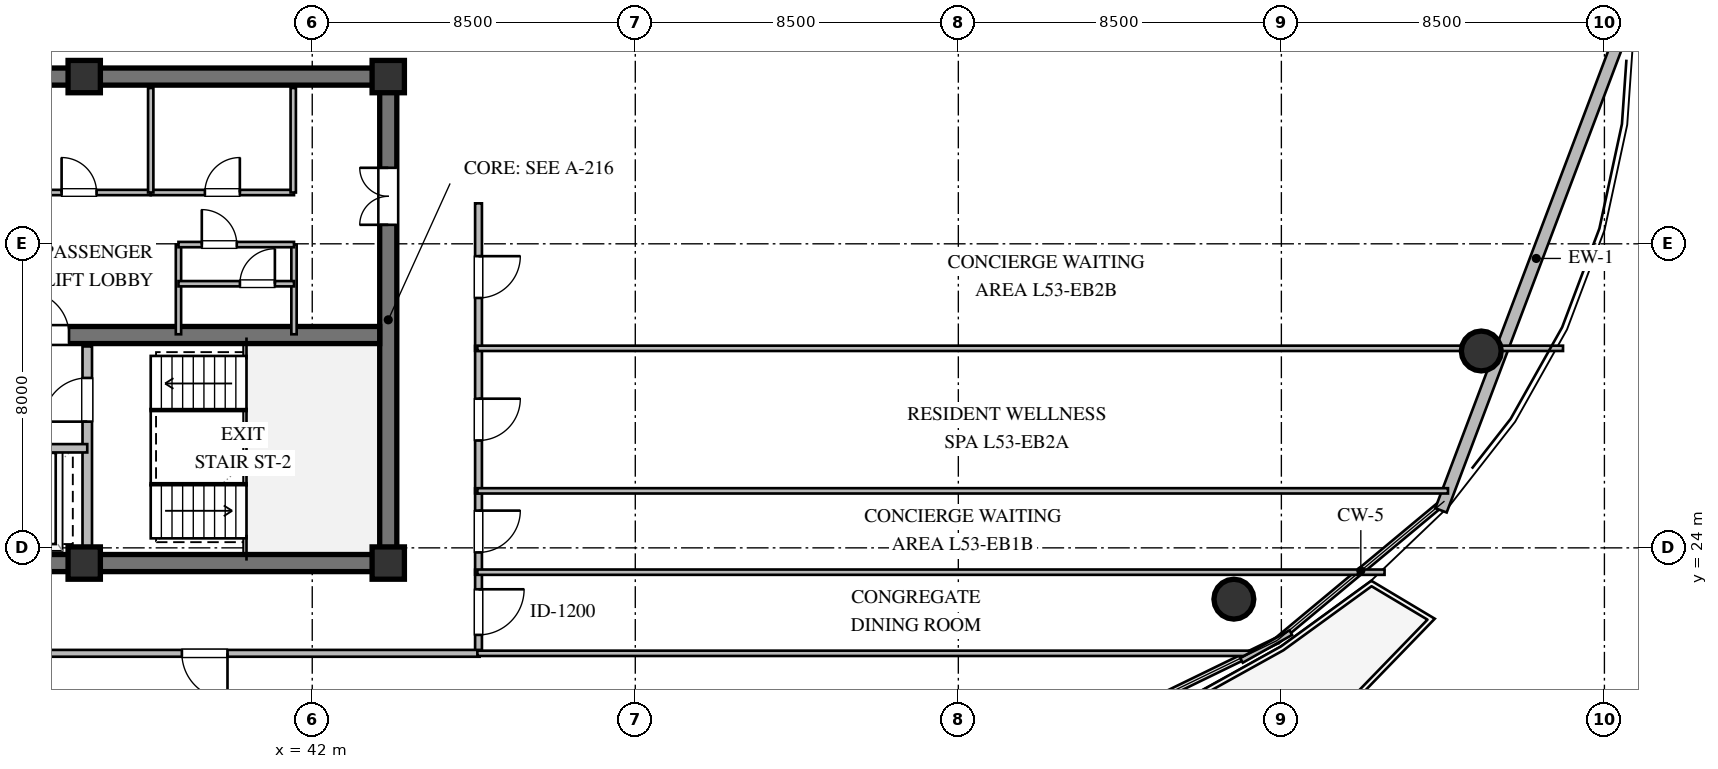
"""IFC4 building model, lengths in metres.
Left out: names, types, materials, properties, quantities, classifications, styles, units other than length and angle.
Written with IfcOpenShell. Run it as: python <this file> out.ifc"""

import sys

from ifc_helpers import new_model, si_unit, direction, frame, frame_2d, origin, origin_2d, place, context, subcontext, project, spatial, rectangle, circle, extrude, element, fill, save


model = new_model("IFC4")
c1 = context("Model", 3, precision=1e-05, world=origin(), true_north=direction((0.0, 1.0)))
c2 = subcontext(c1, "Body", "Model", "MODEL_VIEW")
j1 = project(units=[si_unit("LENGTHUNIT", "METRE"), si_unit("PLANEANGLEUNIT", "RADIAN")], contexts=[c1])
p1 = place(None, origin())
s1 = spatial("IfcSite", under=j1, at=p1, CompositionType="ELEMENT")
p2 = place(p1, origin())
s2 = spatial("IfcBuilding", under=s1, at=p2, CompositionType="ELEMENT")
p3 = place(p2, frame((0.0, 0.0, 202.8)))
s3 = spatial("IfcBuildingStorey", under=s2, at=p3, CompositionType="ELEMENT", Elevation=202.8)
for number, where, z_axis, x_axis in (
    (1, (21.775, 23.6, 0.0), (0.0, 0.0, 1.0), (1.0, 0.0, 0.0)),
    (2, (21.775, 36.4, 0.0), (0.0, 0.0, 1.0), (1.0, 0.0, 0.0)),
):
    element("IfcWall", number, at=place(p3, frame(where, z_axis=z_axis, x_axis=x_axis)), inside=s3, PredefinedType="SHEAR", context=c2, shape_type="SweptSolid", body=[
        extrude(rectangle(XDim=22.45, YDim=0.45, at=frame_2d((11.225, 0.0))), origin(), (0.0, 0.0, 1.0), 3.36),
    ])
p4 = place(p3, frame((44.0, 23.825, 0.0), z_axis=(0.0, 0.0, 1.0), x_axis=(0.0, 1.0, 0.0)))
e3 = element("IfcWall", 3, at=p4, inside=s3, PredefinedType="SHEAR", context=c2, shape_type="SweptSolid", body=[
    extrude(rectangle(XDim=12.35, YDim=0.45, at=frame_2d((6.175, 0.0))), origin(), (0.0, 0.0, 1.0), 3.36),
])
p5 = place(p4, frame((8.675, 0.0, 0.0)))
e4 = element("IfcOpeningElement", 4, at=p5, cuts=e3, PredefinedType="OPENING", context=c2, shape_type="SweptSolid", body=[
    extrude(rectangle(XDim=1.5, YDim=2.15, at=frame_2d((0.75, 1.075))), frame((0.0, 0.235, 0.0), z_axis=(0.0, -1.0, 0.0), x_axis=(1.0, 0.0, 0.0)), (0.0, 0.0, 1.0), 0.47),
])
p6 = place(p3, frame((22.225, 29.6, 0.0), z_axis=(0.0, 0.0, 1.0), x_axis=(1.0, 0.0, 0.0)))
e5 = element("IfcWall", 5, at=p6, inside=s3, PredefinedType="SHEAR", context=c2, shape_type="SweptSolid", body=[
    extrude(rectangle(XDim=21.55, YDim=0.45, at=frame_2d((10.775, 0.0))), origin(), (0.0, 0.0, 1.0), 3.36),
])
p7 = place(p6, frame((12.225, 0.0, 0.0)))
e6 = element("IfcOpeningElement", 6, at=p7, cuts=e5, PredefinedType="OPENING", context=c2, shape_type="SweptSolid", body=[
    extrude(rectangle(XDim=1.15, YDim=2.1, at=frame_2d((0.575, 1.05))), frame((0.0, 0.235, 0.0), z_axis=(0.0, -1.0, 0.0), x_axis=(1.0, 0.0, 0.0)), (0.0, 0.0, 1.0), 0.47),
])
for number, where, z_axis, x_axis in (
    (7, (36.0, 23.6, 0.0), (0.0, 0.0, 1.0), (1.0, 0.0, 0.0)),
    (8, (44.0, 23.6, 0.0), (0.0, 0.0, 1.0), (1.0, 0.0, 0.0)),
    (9, (44.0, 36.4, 0.0), (0.0, 0.0, 1.0), (1.0, 0.0, 0.0)),
    (10, (36.0, 36.4, 0.0), (0.0, 0.0, 1.0), (1.0, 0.0, 0.0)),
):
    element("IfcColumn", number, at=place(p3, frame(where, z_axis=z_axis, x_axis=x_axis)), inside=s3, PredefinedType="COLUMN", context=c2, shape_type="SweptSolid", body=[
        extrude(rectangle(XDim=0.85, YDim=0.85, at=origin_2d()), origin(), (0.0, 0.0, 1.0), 3.6),
    ])
for number, where, z_axis, x_axis in (
    (11, (66.25, 22.65, 0.0), (0.0, 0.0, 1.0), (1.0, 0.0, 0.0)),
    (12, (72.76, 29.18, 0.0), (0.0, 0.0, 1.0), (1.0, 0.0, 0.0)),
):
    element("IfcColumn", number, at=place(p3, frame(where, z_axis=z_axis, x_axis=x_axis)), inside=s3, PredefinedType="COLUMN", context=c2, shape_type="SweptSolid", body=[
        extrude(circle(Radius=0.525, at=origin_2d()), origin(), (0.0, 0.0, 1.0), 3.6),
    ])
p8 = place(p3, frame((76.712, 38.243, 0.0), z_axis=(0.0, 0.0, 1.0), x_axis=(-0.353659523244, -0.935374225441, 0.0)))
e13 = element("IfcWall", 13, at=p8, inside=s3, PredefinedType="STANDARD", context=c2, shape_type="SweptSolid", body=[
    extrude(rectangle(XDim=14.172, YDim=0.32, at=frame_2d((7.086, 0.0))), origin(), (0.0, 0.0, 1.0), 3.36),
])
p9 = place(p3, frame((36.08, 23.9, 0.0), z_axis=(0.0, 0.0, 1.0), x_axis=(0.0, 1.0, 0.0)))
e14 = element("IfcWall", 14, at=p9, inside=s3, PredefinedType="SOLIDWALL", context=c2, shape_type="SweptSolid", body=[
    extrude(rectangle(XDim=5.4, YDim=0.25, at=frame_2d((2.7, 0.0))), origin(), (0.0, 0.0, 1.0), 3.36),
])
p10 = place(p9, frame((3.421, 0.0, 0.0)))
e15 = element("IfcOpeningElement", 15, at=p10, cuts=e14, PredefinedType="OPENING", context=c2, shape_type="SweptSolid", body=[
    extrude(rectangle(XDim=1.15, YDim=2.1, at=frame_2d((0.575, 1.05))), frame((0.0, 0.135, 0.0), z_axis=(0.0, -1.0, 0.0), x_axis=(1.0, 0.0, 0.0)), (0.0, 0.0, 1.0), 0.27),
])
p11 = place(p3, frame((29.92, 26.62, 0.0), z_axis=(0.0, 0.0, 1.0), x_axis=(1.0, 0.0, 0.0)))
e16 = element("IfcWall", 16, at=p11, inside=s3, PredefinedType="SOLIDWALL", context=c2, shape_type="SweptSolid", body=[
    extrude(rectangle(XDim=6.16, YDim=0.22, at=frame_2d((3.08, 0.0))), origin(), (0.0, 0.0, 1.0), 3.36),
])
p12 = place(p11, frame((0.99, 0.0, 0.0)))
e17 = element("IfcOpeningElement", 17, at=p12, cuts=e16, PredefinedType="OPENING", context=c2, shape_type="SweptSolid", body=[
    extrude(rectangle(XDim=1.1, YDim=2.1, at=frame_2d((0.55, 1.05))), frame((0.0, 0.12, 0.0), z_axis=(0.0, -1.0, 0.0), x_axis=(1.0, 0.0, 0.0)), (0.0, 0.0, 1.0), 0.24),
])
p13 = place(p11, frame((4.07, 0.0, 0.0)))
e18 = element("IfcOpeningElement", 18, at=p13, cuts=e16, PredefinedType="OPENING", context=c2, shape_type="SweptSolid", body=[
    extrude(rectangle(XDim=1.1, YDim=2.1, at=frame_2d((0.55, 1.05))), frame((0.0, 0.12, 0.0), z_axis=(0.0, -1.0, 0.0), x_axis=(1.0, 0.0, 0.0)), (0.0, 0.0, 1.0), 0.24),
])
p14 = place(p3, frame((33.98, 33.35, 0.0), z_axis=(0.0, 0.0, 1.0), x_axis=(1.0, 0.0, 0.0)))
e19 = element("IfcWall", 19, at=p14, inside=s3, PredefinedType="PARTITIONING", context=c2, shape_type="SweptSolid", body=[
    extrude(rectangle(XDim=3.77, YDim=0.14, at=frame_2d((1.885, 0.0))), origin(), (0.0, 0.0, 1.0), 3.36),
])
p15 = place(p14, frame((1.425, 0.0, 0.0)))
e20 = element("IfcOpeningElement", 20, at=p15, cuts=e19, PredefinedType="OPENING", context=c2, shape_type="SweptSolid", body=[
    extrude(rectangle(XDim=0.92, YDim=2.1, at=frame_2d((0.46, 1.05))), frame((0.0, 0.08, 0.0), z_axis=(0.0, -1.0, 0.0), x_axis=(1.0, 0.0, 0.0)), (0.0, 0.0, 1.0), 0.16),
])
p16 = place(p3, frame((37.75, 33.35, 0.0), z_axis=(0.0, 0.0, 1.0), x_axis=(1.0, 0.0, 0.0)))
e21 = element("IfcWall", 21, at=p16, inside=s3, PredefinedType="PARTITIONING", context=c2, shape_type="SweptSolid", body=[
    extrude(rectangle(XDim=3.77, YDim=0.14, at=frame_2d((1.885, 0.0))), origin(), (0.0, 0.0, 1.0), 3.36),
])
p17 = place(p16, frame((1.425, 0.0, 0.0)))
e22 = element("IfcOpeningElement", 22, at=p17, cuts=e21, PredefinedType="OPENING", context=c2, shape_type="SweptSolid", body=[
    extrude(rectangle(XDim=0.92, YDim=2.1, at=frame_2d((0.46, 1.05))), frame((0.0, 0.08, 0.0), z_axis=(0.0, -1.0, 0.0), x_axis=(1.0, 0.0, 0.0)), (0.0, 0.0, 1.0), 0.16),
])
for number, where, z_axis, x_axis in (
    (23, (37.75, 33.35, 0.0), (0.0, 0.0, 1.0), (0.0, 1.0, 0.0)),
    (24, (41.5, 33.35, 0.0), (0.0, 0.0, 1.0), (0.0, 1.0, 0.0)),
):
    element("IfcWall", number, at=place(p3, frame(where, z_axis=z_axis, x_axis=x_axis)), inside=s3, PredefinedType="PARTITIONING", context=c2, shape_type="SweptSolid", body=[
        extrude(rectangle(XDim=2.75, YDim=0.14, at=frame_2d((1.375, 0.0))), origin(), (0.0, 0.0, 1.0), 3.36),
    ])
for number, where, z_axis, x_axis in (
    (25, (38.48, 29.62, 0.0), (0.0, 0.0, 1.0), (0.0, 1.0, 0.0)),
    (26, (41.52, 29.62, 0.0), (0.0, 0.0, 1.0), (0.0, 1.0, 0.0)),
):
    element("IfcWall", number, at=place(p3, frame(where, z_axis=z_axis, x_axis=x_axis)), inside=s3, PredefinedType="PARTITIONING", context=c2, shape_type="SweptSolid", body=[
        extrude(rectangle(XDim=2.36, YDim=0.14, at=frame_2d((1.18, 0.0))), origin(), (0.0, 0.0, 1.0), 3.36),
    ])
p18 = place(p3, frame((38.48, 30.95, 0.0), z_axis=(0.0, 0.0, 1.0), x_axis=(1.0, 0.0, 0.0)))
e27 = element("IfcWall", 27, at=p18, inside=s3, PredefinedType="PARTITIONING", context=c2, shape_type="SweptSolid", body=[
    extrude(rectangle(XDim=3.04, YDim=0.14, at=frame_2d((1.52, 0.0))), origin(), (0.0, 0.0, 1.0), 3.36),
])
p19 = place(p18, frame((1.617, 0.0, 0.0)))
e28 = element("IfcOpeningElement", 28, at=p19, cuts=e27, PredefinedType="OPENING", context=c2, shape_type="SweptSolid", body=[
    extrude(rectangle(XDim=0.92, YDim=2.1, at=frame_2d((0.46, 1.05))), frame((0.0, 0.08, 0.0), z_axis=(0.0, -1.0, 0.0), x_axis=(1.0, 0.0, 0.0)), (0.0, 0.0, 1.0), 0.16),
])
p20 = place(p3, frame((38.48, 31.98, 0.0), z_axis=(0.0, 0.0, 1.0), x_axis=(1.0, 0.0, 0.0)))
e29 = element("IfcWall", 29, at=p20, inside=s3, PredefinedType="PARTITIONING", context=c2, shape_type="SweptSolid", body=[
    extrude(rectangle(XDim=3.04, YDim=0.14, at=frame_2d((1.52, 0.0))), origin(), (0.0, 0.0, 1.0), 3.36),
])
p21 = place(p20, frame((0.614, 0.0, 0.0)))
e30 = element("IfcOpeningElement", 30, at=p21, cuts=e29, PredefinedType="OPENING", context=c2, shape_type="SweptSolid", body=[
    extrude(rectangle(XDim=0.92, YDim=2.1, at=frame_2d((0.46, 1.05))), frame((0.0, 0.08, 0.0), z_axis=(0.0, -1.0, 0.0), x_axis=(1.0, 0.0, 0.0)), (0.0, 0.0, 1.0), 0.16),
])
p22 = place(p3, frame((46.375, 23.425, 0.0), z_axis=(0.0, 0.0, 1.0), x_axis=(0.0, -1.0, 0.0)))
e31 = element("IfcWall", 31, at=p22, inside=s3, PredefinedType="PARTITIONING", context=c2, shape_type="SweptSolid", body=[
    extrude(rectangle(XDim=2.23, YDim=0.18, at=frame_2d((1.115, 0.0))), origin(), (0.0, 0.0, 1.0), 3.36),
])
p23 = place(p22, frame((0.515, 0.0, 0.0)))
e32 = element("IfcOpeningElement", 32, at=p23, cuts=e31, PredefinedType="OPENING", context=c2, shape_type="SweptSolid", body=[
    extrude(rectangle(XDim=1.2, YDim=2.15, at=frame_2d((0.6, 1.075))), frame((0.0, 0.1, 0.0), z_axis=(0.0, -1.0, 0.0), x_axis=(1.0, 0.0, 0.0)), (0.0, 0.0, 1.0), 0.2),
])
p24 = place(p3, frame((46.375, 25.565, 0.0), z_axis=(0.0, 0.0, 1.0), x_axis=(0.0, -1.0, 0.0)))
e33 = element("IfcWall", 33, at=p24, inside=s3, PredefinedType="PARTITIONING", context=c2, shape_type="SweptSolid", body=[
    extrude(rectangle(XDim=2.27, YDim=0.18, at=frame_2d((1.135, 0.0))), origin(), (0.0, 0.0, 1.0), 3.36),
])
p25 = place(p24, frame((0.585, 0.0, 0.0)))
e34 = element("IfcOpeningElement", 34, at=p25, cuts=e33, PredefinedType="OPENING", context=c2, shape_type="SweptSolid", body=[
    extrude(rectangle(XDim=1.1, YDim=2.1, at=frame_2d((0.55, 1.05))), frame((0.0, 0.1, 0.0), z_axis=(0.0, -1.0, 0.0), x_axis=(1.0, 0.0, 0.0)), (0.0, 0.0, 1.0), 0.2),
])
p26 = place(p3, frame((46.375, 29.315, 0.0), z_axis=(0.0, 0.0, 1.0), x_axis=(0.0, -1.0, 0.0)))
e35 = element("IfcWall", 35, at=p26, inside=s3, PredefinedType="PARTITIONING", context=c2, shape_type="SweptSolid", body=[
    extrude(rectangle(XDim=3.88, YDim=0.18, at=frame_2d((1.94, 0.0))), origin(), (0.0, 0.0, 1.0), 3.36),
])
p27 = place(p26, frame((1.39, 0.0, 0.0)))
e36 = element("IfcOpeningElement", 36, at=p27, cuts=e35, PredefinedType="OPENING", context=c2, shape_type="SweptSolid", body=[
    extrude(rectangle(XDim=1.1, YDim=2.1, at=frame_2d((0.55, 1.05))), frame((0.0, 0.1, 0.0), z_axis=(0.0, -1.0, 0.0), x_axis=(1.0, 0.0, 0.0)), (0.0, 0.0, 1.0), 0.2),
])
p28 = place(p3, frame((46.375, 33.065, 0.0), z_axis=(0.0, 0.0, 1.0), x_axis=(0.0, -1.0, 0.0)))
e37 = element("IfcWall", 37, at=p28, inside=s3, PredefinedType="PARTITIONING", context=c2, shape_type="SweptSolid", body=[
    extrude(rectangle(XDim=3.88, YDim=0.18, at=frame_2d((1.94, 0.0))), origin(), (0.0, 0.0, 1.0), 3.36),
])
p29 = place(p28, frame((1.39, 0.0, 0.0)))
e38 = element("IfcOpeningElement", 38, at=p29, cuts=e37, PredefinedType="OPENING", context=c2, shape_type="SweptSolid", body=[
    extrude(rectangle(XDim=1.1, YDim=2.1, at=frame_2d((0.55, 1.05))), frame((0.0, 0.1, 0.0), z_axis=(0.0, -1.0, 0.0), x_axis=(1.0, 0.0, 0.0)), (0.0, 0.0, 1.0), 0.2),
])
p30 = place(p3, frame((46.405, 21.225, 0.0), z_axis=(0.0, 0.0, 1.0), x_axis=(-1.0, 0.0, 0.0)))
e39 = element("IfcWall", 39, at=p30, inside=s3, PredefinedType="PARTITIONING", context=c2, shape_type="SweptSolid", body=[
    extrude(rectangle(XDim=14.47, YDim=0.18, at=frame_2d((7.235, 0.0))), origin(), (0.0, 0.0, 1.0), 2.996),
])
p31 = place(p30, frame((6.635, 0.0, 0.0)))
e40 = element("IfcOpeningElement", 40, at=p31, cuts=e39, PredefinedType="OPENING", context=c2, shape_type="SweptSolid", body=[
    extrude(rectangle(XDim=1.2, YDim=2.15, at=frame_2d((0.6, 1.075))), frame((0.0, 0.1, 0.0), z_axis=(0.0, -1.0, 0.0), x_axis=(1.0, 0.0, 0.0)), (0.0, 0.0, 1.0), 0.2),
])
p32 = place(p3, frame((46.345, 23.36, 0.0), z_axis=(0.0, 0.0, 1.0), x_axis=(1.0, 0.0, 0.0)))
e41 = element("IfcWall", 41, at=p32, inside=s3, PredefinedType="PARTITIONING", context=c2, shape_type="SweptSolid", body=[
    extrude(rectangle(XDim=23.87, YDim=0.14, at=frame_2d((11.935, 0.0))), origin(), (0.0, 0.0, 1.0), 2.89),
])
p33 = place(p3, frame((66.684, 21.225, 0.0), z_axis=(0.0, 0.0, 1.0), x_axis=(-1.0, 0.0, 0.0)))
e42 = element("IfcWall", 42, at=p33, inside=s3, PredefinedType="PARTITIONING", context=c2, shape_type="SweptSolid", body=[
    extrude(rectangle(XDim=20.339, YDim=0.14, at=frame_2d((10.169, 0.0))), origin(), (0.0, 0.0, 1.0), 2.996),
])
p34 = place(p3, frame((67.748, 21.77, 0.0), z_axis=(0.0, 0.0, 1.0), x_axis=(-0.871352238731, -0.490658003153, 0.0)))
e43 = element("IfcWall", 43, at=p34, inside=s3, PredefinedType="PARTITIONING", context=c2, shape_type="SweptSolid", body=[
    extrude(rectangle(XDim=1.49, YDim=0.14, at=frame_2d((0.745, 0.0))), origin(), (0.0, 0.0, 1.0), 3.36),
])
p35 = place(p3, frame((46.345, 25.5, 0.0), z_axis=(0.0, 0.0, 1.0), x_axis=(1.0, 0.0, 0.0)))
e44 = element("IfcWall", 44, at=p35, inside=s3, PredefinedType="PARTITIONING", context=c2, shape_type="SweptSolid", body=[
    extrude(rectangle(XDim=25.539, YDim=0.14, at=frame_2d((12.77, 0.0))), origin(), (0.0, 0.0, 1.0), 2.89),
])
p36 = place(p3, frame((46.345, 29.25, 0.0), z_axis=(0.0, 0.0, 1.0), x_axis=(1.0, 0.0, 0.0)))
e45 = element("IfcWall", 45, at=p36, inside=s3, PredefinedType="PARTITIONING", context=c2, shape_type="SweptSolid", body=[
    extrude(rectangle(XDim=28.566, YDim=0.14, at=frame_2d((14.283, 0.0))), origin(), (0.0, 0.0, 1.0), 2.89),
])
p37 = place(p10, origin())
e46 = element("IfcDoor", 46, at=p37, inside=s3, OperationType="SINGLE_SWING_LEFT", PredefinedType="DOOR", context=c2, shape_type="SweptSolid", body=[
    extrude(rectangle(XDim=1.15, YDim=2.1, at=frame_2d((0.575, 1.05))), frame((0.0, 0.025, 0.0), z_axis=(0.0, -1.0, 0.0), x_axis=(1.0, 0.0, 0.0)), (0.0, 0.0, 1.0), 0.05),
])
fill(e15, e46)
p38 = place(p7, origin())
e47 = element("IfcDoor", 47, at=p38, inside=s3, OperationType="SINGLE_SWING_LEFT", PredefinedType="DOOR", context=c2, shape_type="SweptSolid", body=[
    extrude(rectangle(XDim=1.15, YDim=2.1, at=frame_2d((0.575, 1.05))), frame((0.0, 0.025, 0.0), z_axis=(0.0, -1.0, 0.0), x_axis=(1.0, 0.0, 0.0)), (0.0, 0.0, 1.0), 0.05),
])
fill(e6, e47)
p39 = place(p5, origin())
e48 = element("IfcDoor", 48, at=p39, inside=s3, OperationType="DOUBLE_DOOR_SINGLE_SWING", PredefinedType="DOOR", context=c2, shape_type="SweptSolid", body=[
    extrude(rectangle(XDim=1.5, YDim=2.15, at=frame_2d((0.75, 1.075))), frame((0.0, 0.025, 0.0), z_axis=(0.0, -1.0, 0.0), x_axis=(1.0, 0.0, 0.0)), (0.0, 0.0, 1.0), 0.05),
])
fill(e4, e48)
p40 = place(p15, origin())
e49 = element("IfcDoor", 49, at=p40, inside=s3, OperationType="SINGLE_SWING_LEFT", PredefinedType="DOOR", context=c2, shape_type="SweptSolid", body=[
    extrude(rectangle(XDim=0.92, YDim=2.1, at=frame_2d((0.46, 1.05))), frame((0.0, 0.025, 0.0), z_axis=(0.0, -1.0, 0.0), x_axis=(1.0, 0.0, 0.0)), (0.0, 0.0, 1.0), 0.05),
])
fill(e20, e49)
p41 = place(p17, origin())
e50 = element("IfcDoor", 50, at=p41, inside=s3, OperationType="SINGLE_SWING_RIGHT", PredefinedType="DOOR", context=c2, shape_type="SweptSolid", body=[
    extrude(rectangle(XDim=0.92, YDim=2.1, at=frame_2d((0.46, 1.05))), frame((0.0, 0.025, 0.0), z_axis=(0.0, -1.0, 0.0), x_axis=(1.0, 0.0, 0.0)), (0.0, 0.0, 1.0), 0.05),
])
fill(e22, e50)
p42 = place(p21, origin())
e51 = element("IfcDoor", 51, at=p42, inside=s3, OperationType="SINGLE_SWING_LEFT", PredefinedType="DOOR", context=c2, shape_type="SweptSolid", body=[
    extrude(rectangle(XDim=0.92, YDim=2.1, at=frame_2d((0.46, 1.05))), frame((0.0, 0.025, 0.0), z_axis=(0.0, -1.0, 0.0), x_axis=(1.0, 0.0, 0.0)), (0.0, 0.0, 1.0), 0.05),
])
fill(e30, e51)
p43 = place(p19, origin())
e52 = element("IfcDoor", 52, at=p43, inside=s3, OperationType="SINGLE_SWING_RIGHT", PredefinedType="DOOR", context=c2, shape_type="SweptSolid", body=[
    extrude(rectangle(XDim=0.92, YDim=2.1, at=frame_2d((0.46, 1.05))), frame((0.0, 0.025, 0.0), z_axis=(0.0, -1.0, 0.0), x_axis=(1.0, 0.0, 0.0)), (0.0, 0.0, 1.0), 0.05),
])
fill(e28, e52)
p44 = place(p23, origin())
e53 = element("IfcDoor", 53, at=p44, inside=s3, OperationType="SINGLE_SWING_LEFT", PredefinedType="DOOR", context=c2, shape_type="SweptSolid", body=[
    extrude(rectangle(XDim=1.2, YDim=2.15, at=frame_2d((0.6, 1.075))), frame((0.0, 0.025, 0.0), z_axis=(0.0, -1.0, 0.0), x_axis=(1.0, 0.0, 0.0)), (0.0, 0.0, 1.0), 0.05),
])
fill(e32, e53)
p45 = place(p25, origin())
e54 = element("IfcDoor", 54, at=p45, inside=s3, OperationType="SINGLE_SWING_LEFT", PredefinedType="DOOR", context=c2, shape_type="SweptSolid", body=[
    extrude(rectangle(XDim=1.1, YDim=2.1, at=frame_2d((0.55, 1.05))), frame((0.0, 0.025, 0.0), z_axis=(0.0, -1.0, 0.0), x_axis=(1.0, 0.0, 0.0)), (0.0, 0.0, 1.0), 0.05),
])
fill(e34, e54)
p46 = place(p27, origin())
e55 = element("IfcDoor", 55, at=p46, inside=s3, OperationType="SINGLE_SWING_LEFT", PredefinedType="DOOR", context=c2, shape_type="SweptSolid", body=[
    extrude(rectangle(XDim=1.1, YDim=2.1, at=frame_2d((0.55, 1.05))), frame((0.0, 0.025, 0.0), z_axis=(0.0, -1.0, 0.0), x_axis=(1.0, 0.0, 0.0)), (0.0, 0.0, 1.0), 0.05),
])
fill(e36, e55)
p47 = place(p29, origin())
e56 = element("IfcDoor", 56, at=p47, inside=s3, OperationType="SINGLE_SWING_LEFT", PredefinedType="DOOR", context=c2, shape_type="SweptSolid", body=[
    extrude(rectangle(XDim=1.1, YDim=2.1, at=frame_2d((0.55, 1.05))), frame((0.0, 0.025, 0.0), z_axis=(0.0, -1.0, 0.0), x_axis=(1.0, 0.0, 0.0)), (0.0, 0.0, 1.0), 0.05),
])
fill(e38, e56)
p48 = place(p31, origin())
e57 = element("IfcDoor", 57, at=p48, inside=s3, OperationType="SINGLE_SWING_LEFT", PredefinedType="DOOR", context=c2, shape_type="SweptSolid", body=[
    extrude(rectangle(XDim=1.2, YDim=2.15, at=frame_2d((0.6, 1.075))), frame((0.0, 0.025, 0.0), z_axis=(0.0, -1.0, 0.0), x_axis=(1.0, 0.0, 0.0)), (0.0, 0.0, 1.0), 0.05),
])
fill(e40, e57)
save(model, sys.argv[1])
